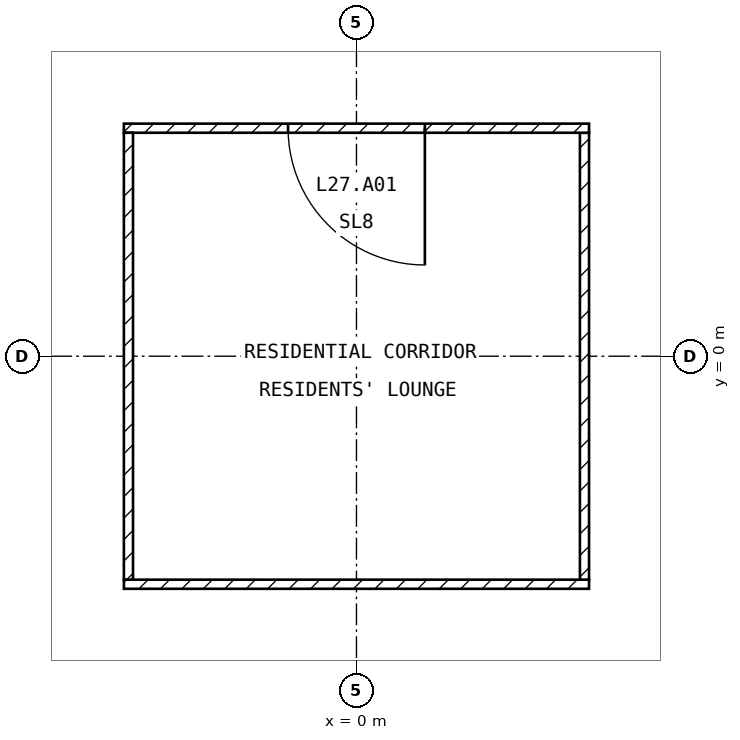
"""IFC4 building model, lengths in metres.
Left out: names, types, materials, properties, quantities, classifications, styles, units other than length and angle.
Written with IfcOpenShell. Run it as: python <this file> out.ifc"""

import sys

from ifc_helpers import new_model, si_unit, direction, frame, frame_2d, origin, place, context, subcontext, project, spatial, rectangle, extrude, element, fill, save


model = new_model("IFC4")
c1 = context("Model", 3, precision=1e-05, world=origin(), true_north=direction((0.0, 1.0)))
c2 = subcontext(c1, "Body", "Model", "MODEL_VIEW")
j1 = project(units=[si_unit("LENGTHUNIT", "METRE"), si_unit("PLANEANGLEUNIT", "RADIAN")], contexts=[c1])
p1 = place(None, origin())
s1 = spatial("IfcSite", under=j1, at=p1, CompositionType="ELEMENT")
p2 = place(p1, origin())
s2 = spatial("IfcBuilding", under=s1, at=p2, CompositionType="ELEMENT")
p3 = place(p2, frame((0.0, 0.0, 116.4)))
s3 = spatial("IfcBuildingStorey", under=s2, at=p3, CompositionType="ELEMENT", Elevation=116.4)
p4 = place(p3, frame((-3.06, -3.0, 0.0), z_axis=(0.0, 0.0, 1.0), x_axis=(1.0, 0.0, 0.0)))
e1 = element("IfcWall", 1, at=p4, inside=s3, PredefinedType="PARTITIONING", context=c2, shape_type="SweptSolid", body=[
    extrude(rectangle(XDim=6.12, YDim=0.12, at=frame_2d((3.06, 0.0))), origin(), (0.0, 0.0, 1.0), 3.25),
])
p5 = place(p3, frame((3.0, -2.94, 0.0), z_axis=(0.0, 0.0, 1.0), x_axis=(0.0, 1.0, 0.0)))
e2 = element("IfcWall", 2, at=p5, inside=s3, PredefinedType="PARTITIONING", context=c2, shape_type="SweptSolid", body=[
    extrude(rectangle(XDim=5.88, YDim=0.12, at=frame_2d((2.94, 0.0))), origin(), (0.0, 0.0, 1.0), 3.25),
])
p6 = place(p3, frame((3.06, 3.0, 0.0), z_axis=(0.0, 0.0, 1.0), x_axis=(-1.0, 0.0, 0.0)))
e3 = element("IfcWall", 3, at=p6, inside=s3, PredefinedType="PARTITIONING", context=c2, shape_type="SweptSolid", body=[
    extrude(rectangle(XDim=6.12, YDim=0.12, at=frame_2d((3.06, 0.0))), origin(), (0.0, 0.0, 1.0), 3.25),
])
p7 = place(p6, frame((2.16, 0.0, 0.0)))
e4 = element("IfcOpeningElement", 4, at=p7, cuts=e3, PredefinedType="OPENING", context=c2, shape_type="SweptSolid", body=[
    extrude(rectangle(XDim=1.8, YDim=2.1, at=frame_2d((0.9, 1.05))), frame((0.0, 0.07, 0.0), z_axis=(0.0, -1.0, 0.0), x_axis=(1.0, 0.0, 0.0)), (0.0, 0.0, 1.0), 0.14),
])
p8 = place(p3, frame((-3.0, 2.94, 0.0), z_axis=(0.0, 0.0, 1.0), x_axis=(0.0, -1.0, 0.0)))
e5 = element("IfcWall", 5, at=p8, inside=s3, PredefinedType="PARTITIONING", context=c2, shape_type="SweptSolid", body=[
    extrude(rectangle(XDim=5.88, YDim=0.12, at=frame_2d((2.94, 0.0))), origin(), (0.0, 0.0, 1.0), 3.25),
])
p9 = place(p7, origin())
e6 = element("IfcDoor", 6, at=p9, inside=s3, OperationType="SINGLE_SWING_LEFT", PredefinedType="DOOR", context=c2, shape_type="SweptSolid", body=[
    extrude(rectangle(XDim=1.8, YDim=2.1, at=frame_2d((0.9, 1.05))), frame((0.0, 0.025, 0.0), z_axis=(0.0, -1.0, 0.0), x_axis=(1.0, 0.0, 0.0)), (0.0, 0.0, 1.0), 0.05),
])
fill(e4, e6)
save(model, sys.argv[1])
